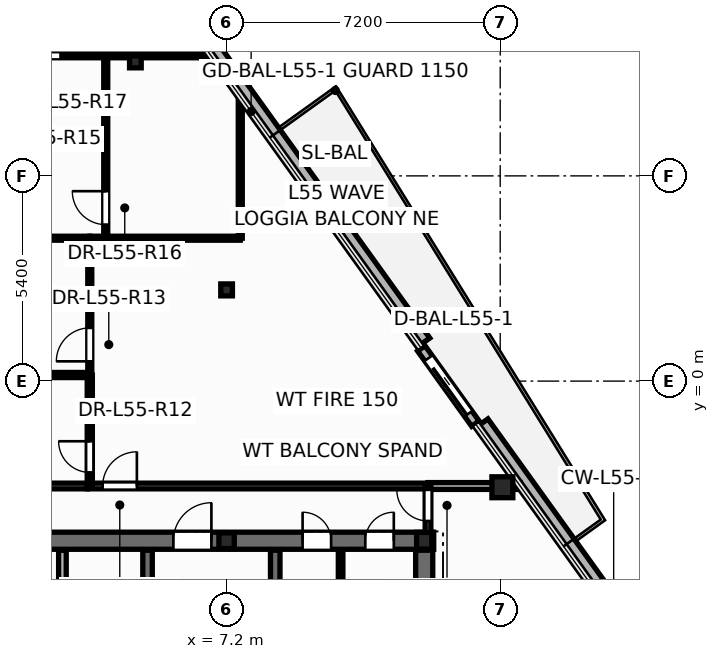
"""IFC4 building model, lengths in metres.
Left out: names, types, materials, properties, quantities, classifications, styles, units other than length and angle.
Written with IfcOpenShell. Run it as: python <this file> out.ifc"""

import sys

from ifc_helpers import new_model, si_unit, direction, frame, frame_2d, origin, origin_2d, place, context, subcontext, project, spatial, rectangle, hollow_circle, i_section, extrude, element, fill, save


model = new_model("IFC4")
c1 = context("Model", 3, precision=1e-05, world=origin(), true_north=direction((0.0, 1.0)))
c2 = subcontext(c1, "Body", "Model", "MODEL_VIEW")
j1 = project(units=[si_unit("LENGTHUNIT", "METRE"), si_unit("PLANEANGLEUNIT", "RADIAN")], contexts=[c1])
p1 = place(None, origin())
s1 = spatial("IfcSite", under=j1, at=p1, CompositionType="ELEMENT")
p2 = place(p1, origin())
s2 = spatial("IfcBuilding", under=s1, at=p2, CompositionType="ELEMENT")
p3 = place(p2, frame((0.0, 0.0, 210.9)))
s3 = spatial("IfcBuildingStorey", under=s2, at=p3, CompositionType="ELEMENT", Elevation=210.9)
for number, where, z_axis, x_axis in (
    (1, (14.457, -2.793, 0.0), (0.0, 0.0, 1.0), (1.0, 0.0, 0.0)),
    (2, (9.236, 4.473, 0.0), (0.0, 0.0, 1.0), (1.0, 0.0, 0.0)),
):
    element("IfcColumn", number, at=place(p3, frame(where, z_axis=z_axis, x_axis=x_axis)), inside=s3, PredefinedType="COLUMN", context=c2, shape_type="SweptSolid", body=[
        extrude(hollow_circle(Radius=0.275, WallThickness=0.024, at=origin_2d()), origin(), (0.0, 0.0, 1.0), 3.6),
    ])
p4 = place(p3, frame((12.4, -4.2, 0.0), z_axis=(0.0, 0.0, 1.0), x_axis=(1.0, 0.0, 0.0)))
e3 = element("IfcColumn", 3, at=p4, inside=s3, PredefinedType="COLUMN", context=c2, shape_type="SweptSolid", body=[
    extrude(i_section(OverallWidth=0.4, OverallDepth=0.44, WebThickness=0.028, FlangeThickness=0.04, at=origin_2d()), origin(), (0.0, 0.0, 1.0), 3.6),
])
p5 = place(p3, frame((7.2, -4.2, 0.0), z_axis=(0.0, 0.0, 1.0), x_axis=(1.0, 0.0, 0.0)))
e4 = element("IfcColumn", 4, at=p5, inside=s3, PredefinedType="PILASTER", context=c2, shape_type="SweptSolid", body=[
    extrude(i_section(OverallWidth=0.405, OverallDepth=0.414, WebThickness=0.022, FlangeThickness=0.032, at=origin_2d()), origin(), (0.0, 0.0, 1.0), 3.6),
])
for number, where, z_axis, x_axis in (
    (5, (7.2, 2.4, 0.0), (0.0, 0.0, 1.0), (1.0, 0.0, 0.0)),
    (6, (4.8, 8.4, 0.0), (0.0, 0.0, 1.0), (1.0, 0.0, 0.0)),
):
    element("IfcColumn", number, at=place(p3, frame(where, z_axis=z_axis, x_axis=x_axis)), inside=s3, PredefinedType="COLUMN", context=c2, shape_type="SweptSolid", body=[
        extrude(i_section(OverallWidth=0.307, OverallDepth=0.314, WebThickness=0.012, FlangeThickness=0.019, at=origin_2d()), origin(), (0.0, 0.0, 1.0), 3.6),
    ])
p6 = place(p3, frame((21.101, -11.079, -0.2), z_axis=(0.0, 0.0, 1.0), x_axis=(-0.583558674799, 0.81207097785, 0.0)))
e7 = element("IfcWall", 7, at=p6, inside=s3, PredefinedType="PARAPET", context=c2, shape_type="SweptSolid", body=[
    extrude(rectangle(XDim=12.289, YDim=0.36, at=frame_2d((6.144, 0.0))), origin(), (0.0, 0.0, 1.0), 0.38),
])
p7 = place(p3, frame((12.401, 1.028, -0.2), z_axis=(0.0, 0.0, 1.0), x_axis=(-0.58354715866, 0.812079253288, 0.0)))
e8 = element("IfcWall", 8, at=p7, inside=s3, PredefinedType="PARAPET", context=c2, shape_type="SweptSolid", body=[
    extrude(rectangle(XDim=15.168, YDim=0.36, at=frame_2d((7.584, 0.0))), origin(), (0.0, 0.0, 1.0), 0.38),
])
p8 = place(p3, frame((13.747, -1.12, -0.015), z_axis=(0.0, 0.0, 1.0), x_axis=(-0.58349791381, 0.812114637585, 0.0)))
e9 = element("IfcWall", 9, at=p8, inside=s3, PredefinedType="STANDARD", context=c2, shape_type="SweptSolid", body=[
    extrude(rectangle(XDim=2.44, YDim=0.24, at=frame_2d((1.22, 0.0))), origin(), (0.0, 0.0, 1.0), 2.802),
])
p9 = place(p8, frame((0.32, 0.0, 0.015)))
e10 = element("IfcOpeningElement", 10, at=p9, cuts=e9, PredefinedType="OPENING", context=c2, shape_type="SweptSolid", body=[
    extrude(rectangle(XDim=1.806, YDim=2.204, at=frame_2d((0.9, 1.102))), frame((0.0, 0.13, 0.0), z_axis=(0.0, -1.0, 0.0), x_axis=(1.0, 0.0, 0.0)), (0.0, 0.0, 1.0), 0.26),
])
p10 = place(p3, frame((10.2, -5.52, 0.0), z_axis=(0.0, 0.0, 1.0), x_axis=(0.0, 1.0, 0.0)))
e11 = element("IfcWall", 11, at=p10, inside=s3, PredefinedType="PARTITIONING", context=c2, shape_type="SweptSolid", body=[
    extrude(rectangle(XDim=1.12, YDim=0.12, at=frame_2d((0.56, 0.0))), origin(), (0.0, 0.0, 1.0), 3.345),
])
p11 = place(p3, frame((-12.65, -4.2, 0.0), z_axis=(0.0, 0.0, 1.0), x_axis=(1.0, 0.0, 0.0)))
e12 = element("IfcWall", 12, at=p11, inside=s3, PredefinedType="SHEAR", context=c2, shape_type="SweptSolid", body=[
    extrude(rectangle(XDim=25.3, YDim=0.45, at=frame_2d((12.65, 0.0))), origin(), (0.0, 0.0, 1.0), 3.6),
])
p12 = place(p11, frame((1.85, 0.0, 0.0)))
e13 = element("IfcOpeningElement", 13, at=p12, cuts=e12, PredefinedType="OPENING", context=c2, shape_type="SweptSolid", body=[
    extrude(rectangle(XDim=0.756, YDim=2.054, at=frame_2d((0.375, 1.027))), frame((0.0, 0.235, 0.0), z_axis=(0.0, -1.0, 0.0), x_axis=(1.0, 0.0, 0.0)), (0.0, 0.0, 1.0), 0.47),
])
p13 = place(p11, frame((21.85, 0.0, 0.0)))
e14 = element("IfcOpeningElement", 14, at=p13, cuts=e12, PredefinedType="OPENING", context=c2, shape_type="SweptSolid", body=[
    extrude(rectangle(XDim=0.756, YDim=2.054, at=frame_2d((0.375, 1.027))), frame((0.0, 0.235, 0.0), z_axis=(0.0, -1.0, 0.0), x_axis=(1.0, 0.0, 0.0)), (0.0, 0.0, 1.0), 0.47),
])
p14 = place(p11, frame((23.5, 0.0, 0.0)))
e15 = element("IfcOpeningElement", 15, at=p14, cuts=e12, PredefinedType="OPENING", context=c2, shape_type="SweptSolid", body=[
    extrude(rectangle(XDim=0.756, YDim=2.054, at=frame_2d((0.375, 1.027))), frame((0.0, 0.235, 0.0), z_axis=(0.0, -1.0, 0.0), x_axis=(1.0, 0.0, 0.0)), (0.0, 0.0, 1.0), 0.47),
])
p15 = place(p11, frame((5.85, 0.0, 0.0)))
e16 = element("IfcOpeningElement", 16, at=p15, cuts=e12, PredefinedType="OPENING", context=c2, shape_type="SweptSolid", body=[
    extrude(rectangle(XDim=1.006, YDim=2.104, at=frame_2d((0.5, 1.052))), frame((0.0, 0.235, 0.0), z_axis=(0.0, -1.0, 0.0), x_axis=(1.0, 0.0, 0.0)), (0.0, 0.0, 1.0), 0.47),
])
p16 = place(p11, frame((10.35, 0.0, 0.0)))
e17 = element("IfcOpeningElement", 17, at=p16, cuts=e12, PredefinedType="OPENING", context=c2, shape_type="SweptSolid", body=[
    extrude(rectangle(XDim=1.406, YDim=2.154, at=frame_2d((0.7, 1.077))), frame((0.0, 0.235, 0.0), z_axis=(0.0, -1.0, 0.0), x_axis=(1.0, 0.0, 0.0)), (0.0, 0.0, 1.0), 0.47),
])
p17 = place(p11, frame((18.45, 0.0, 0.0)))
e18 = element("IfcOpeningElement", 18, at=p17, cuts=e12, PredefinedType="OPENING", context=c2, shape_type="SweptSolid", body=[
    extrude(rectangle(XDim=1.006, YDim=2.104, at=frame_2d((0.5, 1.052))), frame((0.0, 0.235, 0.0), z_axis=(0.0, -1.0, 0.0), x_axis=(1.0, 0.0, 0.0)), (0.0, 0.0, 1.0), 0.47),
])
p18 = place(p3, frame((8.48, -13.85, 0.0), z_axis=(0.0, 0.0, 1.0), x_axis=(0.0, 1.0, 0.0)))
e19 = element("IfcWall", 19, at=p18, inside=s3, PredefinedType="SHEAR", context=c2, shape_type="SweptSolid", body=[
    extrude(rectangle(XDim=9.4, YDim=0.25, at=frame_2d((4.7, 0.0))), origin(), (0.0, 0.0, 1.0), 3.6),
])
p19 = place(p18, frame((6.95, 0.0, 0.0)))
e20 = element("IfcOpeningElement", 20, at=p19, cuts=e19, PredefinedType="OPENING", context=c2, shape_type="SweptSolid", body=[
    extrude(rectangle(XDim=1.006, YDim=2.104, at=frame_2d((0.5, 1.052))), frame((0.0, 0.135, 0.0), z_axis=(0.0, -1.0, 0.0), x_axis=(1.0, 0.0, 0.0)), (0.0, 0.0, 1.0), 0.27),
])
p20 = place(p3, frame((5.12, -13.85, 0.0), z_axis=(0.0, 0.0, 1.0), x_axis=(0.0, 1.0, 0.0)))
e21 = element("IfcWall", 21, at=p20, inside=s3, PredefinedType="SHEAR", context=c2, shape_type="SweptSolid", body=[
    extrude(rectangle(XDim=9.4, YDim=0.25, at=frame_2d((4.7, 0.0))), origin(), (0.0, 0.0, 1.0), 3.6),
])
p21 = place(p3, frame((12.4, -13.85, 0.0), z_axis=(0.0, 0.0, 1.0), x_axis=(0.0, 1.0, 0.0)))
e22 = element("IfcWall", 22, at=p21, inside=s3, PredefinedType="SHEAR", context=c2, shape_type="SweptSolid", body=[
    extrude(rectangle(XDim=9.4, YDim=0.45, at=frame_2d((4.7, 0.0))), origin(), (0.0, 0.0, 1.0), 3.6),
])
p22 = place(p3, frame((2.88, -9.45, 0.0), z_axis=(0.0, 0.0, 1.0), x_axis=(0.0, 1.0, 0.0)))
e23 = element("IfcWall", 23, at=p22, inside=s3, PredefinedType="SOLIDWALL", context=c2, shape_type="SweptSolid", body=[
    extrude(rectangle(XDim=5.0, YDim=0.2, at=frame_2d((2.5, 0.0))), origin(), (0.0, 0.0, 1.0), 3.345),
])
p23 = place(p22, frame((2.05, 0.0, 0.0)))
e24 = element("IfcOpeningElement", 24, at=p23, cuts=e23, PredefinedType="OPENING", context=c2, shape_type="SweptSolid", body=[
    extrude(rectangle(XDim=0.926, YDim=2.104, at=frame_2d((0.46, 1.052))), frame((0.0, 0.11, 0.0), z_axis=(0.0, -1.0, 0.0), x_axis=(1.0, 0.0, 0.0)), (0.0, 0.0, 1.0), 0.22),
])
p24 = place(p3, frame((3.54, -2.76, 0.0), z_axis=(0.0, 0.0, 1.0), x_axis=(1.0, 0.0, 0.0)))
e25 = element("IfcWall", 25, at=p24, inside=s3, PredefinedType="PARTITIONING", context=c2, shape_type="SweptSolid", body=[
    extrude(rectangle(XDim=8.96, YDim=0.15, at=frame_2d((4.48, 0.0))), origin(), (0.0, 0.0, 1.0), 2.32),
])
p25 = place(p24, frame((0.399, 0.0, 0.0)))
e26 = element("IfcOpeningElement", 26, at=p25, cuts=e25, PredefinedType="OPENING", context=c2, shape_type="SweptSolid", body=[
    extrude(rectangle(XDim=0.906, YDim=2.104, at=frame_2d((0.45, 1.052))), frame((0.0, 0.085, 0.0), z_axis=(0.0, -1.0, 0.0), x_axis=(1.0, 0.0, 0.0)), (0.0, 0.0, 1.0), 0.17),
])
p26 = place(p3, frame((4.02, 3.76, 0.0), z_axis=(0.0, 0.0, 1.0), x_axis=(0.0, 1.0, 0.0)))
e27 = element("IfcWall", 27, at=p26, inside=s3, PredefinedType="PARTITIONING", context=c2, shape_type="SweptSolid", body=[
    extrude(rectangle(XDim=4.8, YDim=0.105, at=frame_2d((2.4, 0.0))), origin(), (0.0, 0.0, 1.0), 2.62),
])
p27 = place(p26, frame((0.357, 0.0, 0.0)))
e28 = element("IfcOpeningElement", 28, at=p27, cuts=e27, PredefinedType="OPENING", context=c2, shape_type="SweptSolid", body=[
    extrude(rectangle(XDim=0.886, YDim=2.104, at=frame_2d((0.44, 1.052))), frame((0.0, 0.062, 0.0), z_axis=(0.0, -1.0, 0.0), x_axis=(1.0, 0.0, 0.0)), (0.0, 0.0, 1.0), 0.125),
])
p28 = place(p3, frame((7.56, 3.76, 0.0), z_axis=(0.0, 0.0, 1.0), x_axis=(0.0, 1.0, 0.0)))
e29 = element("IfcWall", 29, at=p28, inside=s3, PredefinedType="PARTITIONING", context=c2, shape_type="SweptSolid", body=[
    extrude(rectangle(XDim=3.73, YDim=0.105, at=frame_2d((1.865, 0.0))), origin(), (0.0, 0.0, 1.0), 2.62),
])
p29 = place(p3, frame((3.6, 0.16, 0.0), z_axis=(0.0, 0.0, 1.0), x_axis=(0.0, 1.0, 0.0)))
e30 = element("IfcWall", 30, at=p29, inside=s3, PredefinedType="PARTITIONING", context=c2, shape_type="SweptSolid", body=[
    extrude(rectangle(XDim=3.6, YDim=0.105, at=frame_2d((1.8, 0.0))), origin(), (0.0, 0.0, 1.0), 2.32),
])
p30 = place(p29, frame((0.36, 0.0, 0.0)))
e31 = element("IfcOpeningElement", 31, at=p30, cuts=e30, PredefinedType="OPENING", context=c2, shape_type="SweptSolid", body=[
    extrude(rectangle(XDim=0.886, YDim=2.104, at=frame_2d((0.44, 1.052))), frame((0.0, 0.062, 0.0), z_axis=(0.0, -1.0, 0.0), x_axis=(1.0, 0.0, 0.0)), (0.0, 0.0, 1.0), 0.125),
])
p31 = place(p3, frame((3.6, 3.76, 0.0), z_axis=(0.0, 0.0, 1.0), x_axis=(1.0, 0.0, 0.0)))
e32 = element("IfcWall", 32, at=p31, inside=s3, PredefinedType="PARTITIONING", context=c2, shape_type="SweptSolid", body=[
    extrude(rectangle(XDim=3.96, YDim=0.105, at=frame_2d((1.98, 0.0))), origin(), (0.0, 0.0, 1.0), 2.62),
])
p32 = place(p3, frame((1.0, 8.56, 0.0), z_axis=(0.0, 0.0, 1.0), x_axis=(1.0, 0.0, 0.0)))
e33 = element("IfcWall", 33, at=p32, inside=s3, PredefinedType="PARTITIONING", context=c2, shape_type="SweptSolid", body=[
    extrude(rectangle(XDim=3.02, YDim=0.105, at=frame_2d((1.51, 0.0))), origin(), (0.0, 0.0, 1.0), 2.62),
])
p33 = place(p32, frame((0.951, 0.0, 0.0)))
e34 = element("IfcOpeningElement", 34, at=p33, cuts=e33, PredefinedType="OPENING", context=c2, shape_type="SweptSolid", body=[
    extrude(rectangle(XDim=0.886, YDim=2.104, at=frame_2d((0.44, 1.052))), frame((0.0, 0.062, 0.0), z_axis=(0.0, -1.0, 0.0), x_axis=(1.0, 0.0, 0.0)), (0.0, 0.0, 1.0), 0.125),
])
p34 = place(p3, frame((3.6, -2.76, 0.0), z_axis=(0.0, 0.0, 1.0), x_axis=(0.0, 1.0, 0.0)))
e35 = element("IfcWall", 35, at=p34, inside=s3, PredefinedType="PARTITIONING", context=c2, shape_type="SweptSolid", body=[
    extrude(rectangle(XDim=2.92, YDim=0.135, at=frame_2d((1.46, 0.0))), origin(), (0.0, 0.0, 1.0), 2.965),
])
p35 = place(p34, frame((0.357, 0.0, 0.0)))
e36 = element("IfcOpeningElement", 36, at=p35, cuts=e35, PredefinedType="OPENING", context=c2, shape_type="SweptSolid", body=[
    extrude(rectangle(XDim=0.826, YDim=2.104, at=frame_2d((0.41, 1.052))), frame((0.0, 0.078, 0.0), z_axis=(0.0, -1.0, 0.0), x_axis=(1.0, 0.0, 0.0)), (0.0, 0.0, 1.0), 0.155),
])
p36 = place(p3, frame((4.02, 8.56, 0.0), z_axis=(0.0, 0.0, 1.0), x_axis=(1.0, 0.0, 0.0)))
e37 = element("IfcWall", 37, at=p36, inside=s3, PredefinedType="PARTITIONING", context=c2, shape_type="SweptSolid", body=[
    extrude(rectangle(XDim=2.771, YDim=0.105, at=frame_2d((1.386, 0.0))), origin(), (0.0, 0.0, 1.0), 2.62),
])
p37 = place(p3, frame((-1.538, -2.76, 0.0), z_axis=(0.0, 0.0, 1.0), x_axis=(1.0, 0.0, 0.0)))
e38 = element("IfcWall", 38, at=p37, inside=s3, PredefinedType="PARTITIONING", context=c2, shape_type="SweptSolid", body=[
    extrude(rectangle(XDim=5.076, YDim=0.15, at=frame_2d((2.538, 0.0))), origin(), (0.0, 0.0, 1.0), 2.32),
])
p38 = place(p3, frame((-1.6, 0.16, 0.0), z_axis=(0.0, 0.0, 1.0), x_axis=(1.0, 0.0, 0.0)))
e39 = element("IfcWall", 39, at=p38, inside=s3, PredefinedType="PARTITIONING", context=c2, shape_type="SweptSolid", body=[
    extrude(rectangle(XDim=5.2, YDim=0.135, at=frame_2d((2.6, 0.0))), origin(), (0.0, 0.0, 1.0), 2.32),
])
p39 = place(p3, frame((1.0, 3.76, 0.0), z_axis=(0.0, 0.0, 1.0), x_axis=(1.0, 0.0, 0.0)))
e40 = element("IfcWall", 40, at=p39, inside=s3, PredefinedType="PARTITIONING", context=c2, shape_type="SweptSolid", body=[
    extrude(rectangle(XDim=2.6, YDim=0.105, at=frame_2d((1.3, 0.0))), origin(), (0.0, 0.0, 1.0), 2.965),
])
p40 = place(p39, frame((0.548, 0.0, 0.0)))
e41 = element("IfcOpeningElement", 41, at=p40, cuts=e40, PredefinedType="OPENING", context=c2, shape_type="SweptSolid", body=[
    extrude(rectangle(XDim=0.886, YDim=2.104, at=frame_2d((0.44, 1.052))), frame((0.0, 0.062, 0.0), z_axis=(0.0, -1.0, 0.0), x_axis=(1.0, 0.0, 0.0)), (0.0, 0.0, 1.0), 0.125),
])
p41 = place(p3, frame((12.5, -2.76, 0.0), z_axis=(0.0, 0.0, 1.0), x_axis=(1.0, 0.0, 0.0)))
e42 = element("IfcWall", 42, at=p41, inside=s3, PredefinedType="PARTITIONING", context=c2, shape_type="SweptSolid", body=[
    extrude(rectangle(XDim=2.426, YDim=0.18, at=frame_2d((1.213, 0.0))), origin(), (0.0, 0.0, 1.0), 2.62),
])
p42 = place(p3, frame((12.5, -4.24, 0.0), z_axis=(0.0, 0.0, 1.0), x_axis=(0.0, 1.0, 0.0)))
e43 = element("IfcWall", 43, at=p42, inside=s3, PredefinedType="PARTITIONING", context=c2, shape_type="SweptSolid", body=[
    extrude(rectangle(XDim=1.48, YDim=0.15, at=frame_2d((0.74, 0.0))), origin(), (0.0, 0.0, 1.0), 2.32),
])
p43 = place(p42, frame((0.56, 0.0, 0.0)))
e44 = element("IfcOpeningElement", 44, at=p43, cuts=e43, PredefinedType="OPENING", context=c2, shape_type="SweptSolid", body=[
    extrude(rectangle(XDim=0.826, YDim=2.104, at=frame_2d((0.41, 1.052))), frame((0.0, 0.085, 0.0), z_axis=(0.0, -1.0, 0.0), x_axis=(1.0, 0.0, 0.0)), (0.0, 0.0, 1.0), 0.17),
])
p44 = place(p9, origin())
e45 = element("IfcDoor", 45, at=p44, inside=s3, OperationType="SLIDING_TO_LEFT", PredefinedType="DOOR", context=c2, shape_type="SweptSolid", body=[
    extrude(rectangle(XDim=1.8, YDim=2.2, at=frame_2d((0.9, 1.1))), frame((0.0, 0.025, 0.0), z_axis=(0.0, -1.0, 0.0), x_axis=(1.0, 0.0, 0.0)), (0.0, 0.0, 1.0), 0.05),
])
fill(e10, e45)
p45 = place(p13, origin())
e46 = element("IfcDoor", 46, at=p45, inside=s3, OperationType="SINGLE_SWING_LEFT", PredefinedType="DOOR", context=c2, shape_type="SweptSolid", body=[
    extrude(rectangle(XDim=0.75, YDim=2.05, at=frame_2d((0.375, 1.025))), frame((0.0, 0.025, 0.0), z_axis=(0.0, -1.0, 0.0), x_axis=(1.0, 0.0, 0.0)), (0.0, 0.0, 1.0), 0.05),
])
fill(e14, e46)
p46 = place(p14, origin())
e47 = element("IfcDoor", 47, at=p46, inside=s3, OperationType="SINGLE_SWING_RIGHT", PredefinedType="DOOR", context=c2, shape_type="SweptSolid", body=[
    extrude(rectangle(XDim=0.75, YDim=2.05, at=frame_2d((0.375, 1.025))), frame((0.0, 0.025, 0.0), z_axis=(0.0, -1.0, 0.0), x_axis=(1.0, 0.0, 0.0)), (0.0, 0.0, 1.0), 0.05),
])
fill(e15, e47)
p47 = place(p17, origin())
e48 = element("IfcDoor", 48, at=p47, inside=s3, OperationType="SINGLE_SWING_RIGHT", PredefinedType="DOOR", context=c2, shape_type="SweptSolid", body=[
    extrude(rectangle(XDim=1.0, YDim=2.1, at=frame_2d((0.5, 1.05))), frame((0.0, 0.025, 0.0), z_axis=(0.0, -1.0, 0.0), x_axis=(1.0, 0.0, 0.0)), (0.0, 0.0, 1.0), 0.05),
])
fill(e18, e48)
p48 = place(p43, origin())
e49 = element("IfcDoor", 49, at=p48, inside=s3, OperationType="SINGLE_SWING_RIGHT", PredefinedType="DOOR", context=c2, shape_type="SweptSolid", body=[
    extrude(rectangle(XDim=0.82, YDim=2.1, at=frame_2d((0.41, 1.05))), frame((0.0, 0.025, 0.0), z_axis=(0.0, -1.0, 0.0), x_axis=(1.0, 0.0, 0.0)), (0.0, 0.0, 1.0), 0.05),
])
fill(e44, e49)
p49 = place(p35, origin())
e50 = element("IfcDoor", 50, at=p49, inside=s3, OperationType="SINGLE_SWING_RIGHT", PredefinedType="DOOR", context=c2, shape_type="SweptSolid", body=[
    extrude(rectangle(XDim=0.82, YDim=2.1, at=frame_2d((0.41, 1.05))), frame((0.0, 0.025, 0.0), z_axis=(0.0, -1.0, 0.0), x_axis=(1.0, 0.0, 0.0)), (0.0, 0.0, 1.0), 0.05),
])
fill(e36, e50)
p50 = place(p30, origin())
e51 = element("IfcDoor", 51, at=p50, inside=s3, OperationType="SINGLE_SWING_LEFT", PredefinedType="DOOR", context=c2, shape_type="SweptSolid", body=[
    extrude(rectangle(XDim=0.88, YDim=2.1, at=frame_2d((0.44, 1.05))), frame((0.0, 0.025, 0.0), z_axis=(0.0, -1.0, 0.0), x_axis=(1.0, 0.0, 0.0)), (0.0, 0.0, 1.0), 0.05),
])
fill(e31, e51)
p51 = place(p25, origin())
e52 = element("IfcDoor", 52, at=p51, inside=s3, OperationType="SINGLE_SWING_RIGHT", PredefinedType="DOOR", context=c2, shape_type="SweptSolid", body=[
    extrude(rectangle(XDim=0.9, YDim=2.1, at=frame_2d((0.45, 1.05))), frame((0.0, 0.025, 0.0), z_axis=(0.0, -1.0, 0.0), x_axis=(1.0, 0.0, 0.0)), (0.0, 0.0, 1.0), 0.05),
])
fill(e26, e52)
p52 = place(p33, origin())
e53 = element("IfcDoor", 53, at=p52, inside=s3, OperationType="SINGLE_SWING_LEFT", PredefinedType="DOOR", context=c2, shape_type="SweptSolid", body=[
    extrude(rectangle(XDim=0.88, YDim=2.1, at=frame_2d((0.44, 1.05))), frame((0.0, 0.025, 0.0), z_axis=(0.0, -1.0, 0.0), x_axis=(1.0, 0.0, 0.0)), (0.0, 0.0, 1.0), 0.05),
])
fill(e34, e53)
p53 = place(p27, origin())
e54 = element("IfcDoor", 54, at=p53, inside=s3, OperationType="SINGLE_SWING_RIGHT", PredefinedType="DOOR", context=c2, shape_type="SweptSolid", body=[
    extrude(rectangle(XDim=0.88, YDim=2.1, at=frame_2d((0.44, 1.05))), frame((0.0, 0.025, 0.0), z_axis=(0.0, -1.0, 0.0), x_axis=(1.0, 0.0, 0.0)), (0.0, 0.0, 1.0), 0.05),
])
fill(e28, e54)
save(model, sys.argv[1])
